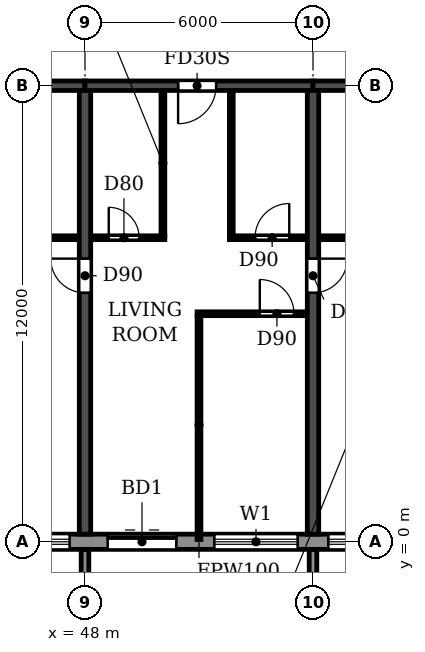
"""IFC4 building model, lengths in metres.
Left out: names, types, materials, properties, quantities, classifications, styles, units other than length and angle.
Written with IfcOpenShell. Run it as: python <this file> out.ifc"""

import sys

from ifc_helpers import new_model, si_unit, direction, frame, frame_2d, origin, place, context, subcontext, project, spatial, polyline, rectangle, outline, extrude, source, transform, mapped, element, fill, save


model = new_model("IFC4")
c1 = context("Model", 3, precision=1e-05, world=origin(), true_north=direction((0.0, 1.0)))
c2 = subcontext(c1, "Body", "Model", "MODEL_VIEW")
j1 = project(units=[si_unit("LENGTHUNIT", "METRE"), si_unit("PLANEANGLEUNIT", "RADIAN")], contexts=[c1])
p1 = place(None, origin())
s1 = spatial("IfcSite", under=j1, at=p1, CompositionType="ELEMENT")
p2 = place(p1, origin())
s2 = spatial("IfcBuilding", under=s1, at=p2, CompositionType="ELEMENT")
p3 = place(p2, frame((0.0, 0.0, 152.1)))
s3 = spatial("IfcBuildingStorey", under=s2, at=p3, CompositionType="ELEMENT", Elevation=152.1)
p4 = place(p3, frame((48.0, 0.2, 0.0), z_axis=(0.0, 0.0, 1.0), x_axis=(0.0, 1.0, 0.0)))
e1 = element("IfcWall", 1, at=p4, inside=s3, PredefinedType="SHEAR", context=c2, shape_type="SweptSolid", body=[
    extrude(rectangle(XDim=11.675, YDim=0.3, at=frame_2d((5.837, 0.0))), origin(), (0.0, 0.0, 1.0), 3.07),
])
p5 = place(p4, frame((6.35, 0.0, 0.0)))
e2 = element("IfcOpeningElement", 2, at=p5, cuts=e1, PredefinedType="OPENING", context=c2, shape_type="SweptSolid", body=[
    extrude(rectangle(XDim=0.9, YDim=2.1, at=frame_2d((0.45, 1.05))), frame((0.0, 0.16, 0.0), z_axis=(0.0, -1.0, 0.0), x_axis=(1.0, 0.0, 0.0)), (0.0, 0.0, 1.0), 0.32),
])
p6 = place(p3, frame((54.0, 0.2, 0.0), z_axis=(0.0, 0.0, 1.0), x_axis=(0.0, 1.0, 0.0)))
e3 = element("IfcWall", 3, at=p6, inside=s3, PredefinedType="SHEAR", context=c2, shape_type="SweptSolid", body=[
    extrude(rectangle(XDim=11.675, YDim=0.3, at=frame_2d((5.837, 0.0))), origin(), (0.0, 0.0, 1.0), 3.07),
])
p7 = place(p6, frame((6.35, 0.0, 0.0)))
e4 = element("IfcOpeningElement", 4, at=p7, cuts=e3, PredefinedType="OPENING", context=c2, shape_type="SweptSolid", body=[
    extrude(rectangle(XDim=0.9, YDim=2.1, at=frame_2d((0.45, 1.05))), frame((0.0, 0.16, 0.0), z_axis=(0.0, -1.0, 0.0), x_axis=(1.0, 0.0, 0.0)), (0.0, 0.0, 1.0), 0.32),
])
p8 = place(p3, frame((42.0, 12.0, 0.0), z_axis=(0.0, 0.0, 1.0), x_axis=(1.0, 0.0, 0.0)))
e5 = element("IfcWall", 5, at=p8, inside=s3, PredefinedType="SHEAR", context=c2, shape_type="SweptSolid", body=[
    extrude(rectangle(XDim=6.0, YDim=0.25, at=frame_2d((3.0, 0.0))), origin(), (0.0, 0.0, 1.0), 2.47),
])
p9 = place(p3, frame((48.0, 12.0, 0.0), z_axis=(0.0, 0.0, 1.0), x_axis=(1.0, 0.0, 0.0)))
e6 = element("IfcWall", 6, at=p9, inside=s3, PredefinedType="SHEAR", context=c2, shape_type="SweptSolid", body=[
    extrude(rectangle(XDim=6.0, YDim=0.25, at=frame_2d((3.0, 0.0))), origin(), (0.0, 0.0, 1.0), 2.47),
])
p10 = place(p9, frame((2.45, 0.0, 0.0)))
e7 = element("IfcOpeningElement", 7, at=p10, cuts=e6, PredefinedType="OPENING", context=c2, shape_type="SweptSolid", body=[
    extrude(rectangle(XDim=1.0, YDim=2.1, at=frame_2d((0.5, 1.05))), frame((0.0, 0.135, 0.0), z_axis=(0.0, -1.0, 0.0), x_axis=(1.0, 0.0, 0.0)), (0.0, 0.0, 1.0), 0.27),
])
p11 = place(p3, frame((54.0, 12.0, 0.0), z_axis=(0.0, 0.0, 1.0), x_axis=(1.0, 0.0, 0.0)))
e8 = element("IfcWall", 8, at=p11, inside=s3, PredefinedType="SHEAR", context=c2, shape_type="SweptSolid", body=[
    extrude(rectangle(XDim=6.0, YDim=0.25, at=frame_2d((3.0, 0.0))), origin(), (0.0, 0.0, 1.0), 2.47),
])
p12 = place(p3, frame((16.683, 0.0, 0.0), z_axis=(0.0, 0.0, 1.0), x_axis=(1.0, 0.0, 0.0)))
e9 = element("IfcWall", 9, at=p12, inside=s3, PredefinedType="STANDARD", context=c2, shape_type="SweptSolid", body=[
    extrude(rectangle(XDim=68.634, YDim=0.4, at=frame_2d((34.317, 0.0))), origin(), (0.0, 0.0, 1.0), 3.07),
])
p13 = place(p12, frame((1.717, 0.0, 0.9)))
e10 = element("IfcOpeningElement", 10, at=p13, cuts=e9, PredefinedType="OPENING", context=c2, shape_type="SweptSolid", body=[
    extrude(rectangle(XDim=2.2, YDim=1.5, at=frame_2d((1.1, 0.75))), frame((0.0, 0.21, 0.0), z_axis=(0.0, -1.0, 0.0), x_axis=(1.0, 0.0, 0.0)), (0.0, 0.0, 1.0), 0.42),
])
p14 = place(p12, frame((4.717, 0.0, 0.9)))
e11 = element("IfcOpeningElement", 11, at=p14, cuts=e9, PredefinedType="OPENING", context=c2, shape_type="SweptSolid", body=[
    extrude(rectangle(XDim=2.2, YDim=1.5, at=frame_2d((1.1, 0.75))), frame((0.0, 0.21, 0.0), z_axis=(0.0, -1.0, 0.0), x_axis=(1.0, 0.0, 0.0)), (0.0, 0.0, 1.0), 0.42),
])
p15 = place(p12, frame((7.917, 0.0, 0.0)))
e12 = element("IfcOpeningElement", 12, at=p15, cuts=e9, PredefinedType="OPENING", context=c2, shape_type="SweptSolid", body=[
    extrude(rectangle(XDim=1.8, YDim=2.4, at=frame_2d((0.9, 1.2))), frame((0.0, 0.21, 0.0), z_axis=(0.0, -1.0, 0.0), x_axis=(1.0, 0.0, 0.0)), (0.0, 0.0, 1.0), 0.42),
])
p16 = place(p12, frame((10.717, 0.0, 0.9)))
e13 = element("IfcOpeningElement", 13, at=p16, cuts=e9, PredefinedType="OPENING", context=c2, shape_type="SweptSolid", body=[
    extrude(rectangle(XDim=2.2, YDim=1.5, at=frame_2d((1.1, 0.75))), frame((0.0, 0.21, 0.0), z_axis=(0.0, -1.0, 0.0), x_axis=(1.0, 0.0, 0.0)), (0.0, 0.0, 1.0), 0.42),
])
p17 = place(p12, frame((13.717, 0.0, 0.9)))
e14 = element("IfcOpeningElement", 14, at=p17, cuts=e9, PredefinedType="OPENING", context=c2, shape_type="SweptSolid", body=[
    extrude(rectangle(XDim=2.2, YDim=1.5, at=frame_2d((1.1, 0.75))), frame((0.0, 0.21, 0.0), z_axis=(0.0, -1.0, 0.0), x_axis=(1.0, 0.0, 0.0)), (0.0, 0.0, 1.0), 0.42),
])
p18 = place(p12, frame((16.717, 0.0, 0.9)))
e15 = element("IfcOpeningElement", 15, at=p18, cuts=e9, PredefinedType="OPENING", context=c2, shape_type="SweptSolid", body=[
    extrude(rectangle(XDim=2.2, YDim=1.5, at=frame_2d((1.1, 0.75))), frame((0.0, 0.21, 0.0), z_axis=(0.0, -1.0, 0.0), x_axis=(1.0, 0.0, 0.0)), (0.0, 0.0, 1.0), 0.42),
])
p19 = place(p12, frame((19.717, 0.0, 0.9)))
e16 = element("IfcOpeningElement", 16, at=p19, cuts=e9, PredefinedType="OPENING", context=c2, shape_type="SweptSolid", body=[
    extrude(rectangle(XDim=2.2, YDim=1.5, at=frame_2d((1.1, 0.75))), frame((0.0, 0.21, 0.0), z_axis=(0.0, -1.0, 0.0), x_axis=(1.0, 0.0, 0.0)), (0.0, 0.0, 1.0), 0.42),
])
p20 = place(p12, frame((22.917, 0.0, 0.0)))
e17 = element("IfcOpeningElement", 17, at=p20, cuts=e9, PredefinedType="OPENING", context=c2, shape_type="SweptSolid", body=[
    extrude(rectangle(XDim=1.8, YDim=2.4, at=frame_2d((0.9, 1.2))), frame((0.0, 0.21, 0.0), z_axis=(0.0, -1.0, 0.0), x_axis=(1.0, 0.0, 0.0)), (0.0, 0.0, 1.0), 0.42),
])
p21 = place(p12, frame((25.717, 0.0, 0.9)))
e18 = element("IfcOpeningElement", 18, at=p21, cuts=e9, PredefinedType="OPENING", context=c2, shape_type="SweptSolid", body=[
    extrude(rectangle(XDim=2.2, YDim=1.5, at=frame_2d((1.1, 0.75))), frame((0.0, 0.21, 0.0), z_axis=(0.0, -1.0, 0.0), x_axis=(1.0, 0.0, 0.0)), (0.0, 0.0, 1.0), 0.42),
])
p22 = place(p12, frame((28.717, 0.0, 0.9)))
e19 = element("IfcOpeningElement", 19, at=p22, cuts=e9, PredefinedType="OPENING", context=c2, shape_type="SweptSolid", body=[
    extrude(rectangle(XDim=2.2, YDim=1.5, at=frame_2d((1.1, 0.75))), frame((0.0, 0.21, 0.0), z_axis=(0.0, -1.0, 0.0), x_axis=(1.0, 0.0, 0.0)), (0.0, 0.0, 1.0), 0.42),
])
p23 = place(p12, frame((31.917, 0.0, 0.0)))
e20 = element("IfcOpeningElement", 20, at=p23, cuts=e9, PredefinedType="OPENING", context=c2, shape_type="SweptSolid", body=[
    extrude(rectangle(XDim=1.8, YDim=2.4, at=frame_2d((0.9, 1.2))), frame((0.0, 0.21, 0.0), z_axis=(0.0, -1.0, 0.0), x_axis=(1.0, 0.0, 0.0)), (0.0, 0.0, 1.0), 0.42),
])
p24 = place(p12, frame((34.717, 0.0, 0.9)))
e21 = element("IfcOpeningElement", 21, at=p24, cuts=e9, PredefinedType="OPENING", context=c2, shape_type="SweptSolid", body=[
    extrude(rectangle(XDim=2.2, YDim=1.5, at=frame_2d((1.1, 0.75))), frame((0.0, 0.21, 0.0), z_axis=(0.0, -1.0, 0.0), x_axis=(1.0, 0.0, 0.0)), (0.0, 0.0, 1.0), 0.42),
])
p25 = place(p12, frame((37.717, 0.0, 0.9)))
e22 = element("IfcOpeningElement", 22, at=p25, cuts=e9, PredefinedType="OPENING", context=c2, shape_type="SweptSolid", body=[
    extrude(rectangle(XDim=2.2, YDim=1.5, at=frame_2d((1.1, 0.75))), frame((0.0, 0.21, 0.0), z_axis=(0.0, -1.0, 0.0), x_axis=(1.0, 0.0, 0.0)), (0.0, 0.0, 1.0), 0.42),
])
p26 = place(p12, frame((40.717, 0.0, 0.9)))
e23 = element("IfcOpeningElement", 23, at=p26, cuts=e9, PredefinedType="OPENING", context=c2, shape_type="SweptSolid", body=[
    extrude(rectangle(XDim=2.2, YDim=1.5, at=frame_2d((1.1, 0.75))), frame((0.0, 0.21, 0.0), z_axis=(0.0, -1.0, 0.0), x_axis=(1.0, 0.0, 0.0)), (0.0, 0.0, 1.0), 0.42),
])
p27 = place(p12, frame((43.717, 0.0, 0.9)))
e24 = element("IfcOpeningElement", 24, at=p27, cuts=e9, PredefinedType="OPENING", context=c2, shape_type="SweptSolid", body=[
    extrude(rectangle(XDim=2.2, YDim=1.5, at=frame_2d((1.1, 0.75))), frame((0.0, 0.21, 0.0), z_axis=(0.0, -1.0, 0.0), x_axis=(1.0, 0.0, 0.0)), (0.0, 0.0, 1.0), 0.42),
])
p28 = place(p12, frame((46.917, 0.0, 0.0)))
e25 = element("IfcOpeningElement", 25, at=p28, cuts=e9, PredefinedType="OPENING", context=c2, shape_type="SweptSolid", body=[
    extrude(rectangle(XDim=1.8, YDim=2.4, at=frame_2d((0.9, 1.2))), frame((0.0, 0.21, 0.0), z_axis=(0.0, -1.0, 0.0), x_axis=(1.0, 0.0, 0.0)), (0.0, 0.0, 1.0), 0.42),
])
p29 = place(p12, frame((49.717, 0.0, 0.9)))
e26 = element("IfcOpeningElement", 26, at=p29, cuts=e9, PredefinedType="OPENING", context=c2, shape_type="SweptSolid", body=[
    extrude(rectangle(XDim=2.2, YDim=1.5, at=frame_2d((1.1, 0.75))), frame((0.0, 0.21, 0.0), z_axis=(0.0, -1.0, 0.0), x_axis=(1.0, 0.0, 0.0)), (0.0, 0.0, 1.0), 0.42),
])
p30 = place(p12, frame((52.717, 0.0, 0.9)))
e27 = element("IfcOpeningElement", 27, at=p30, cuts=e9, PredefinedType="OPENING", context=c2, shape_type="SweptSolid", body=[
    extrude(rectangle(XDim=2.2, YDim=1.5, at=frame_2d((1.1, 0.75))), frame((0.0, 0.21, 0.0), z_axis=(0.0, -1.0, 0.0), x_axis=(1.0, 0.0, 0.0)), (0.0, 0.0, 1.0), 0.42),
])
p31 = place(p12, frame((55.717, 0.0, 0.9)))
e28 = element("IfcOpeningElement", 28, at=p31, cuts=e9, PredefinedType="OPENING", context=c2, shape_type="SweptSolid", body=[
    extrude(rectangle(XDim=2.2, YDim=1.5, at=frame_2d((1.1, 0.75))), frame((0.0, 0.21, 0.0), z_axis=(0.0, -1.0, 0.0), x_axis=(1.0, 0.0, 0.0)), (0.0, 0.0, 1.0), 0.42),
])
p32 = place(p12, frame((58.917, 0.0, 0.0)))
e29 = element("IfcOpeningElement", 29, at=p32, cuts=e9, PredefinedType="OPENING", context=c2, shape_type="SweptSolid", body=[
    extrude(rectangle(XDim=1.8, YDim=2.4, at=frame_2d((0.9, 1.2))), frame((0.0, 0.21, 0.0), z_axis=(0.0, -1.0, 0.0), x_axis=(1.0, 0.0, 0.0)), (0.0, 0.0, 1.0), 0.42),
])
p33 = place(p12, frame((61.717, 0.0, 0.9)))
e30 = element("IfcOpeningElement", 30, at=p33, cuts=e9, PredefinedType="OPENING", context=c2, shape_type="SweptSolid", body=[
    extrude(rectangle(XDim=2.2, YDim=1.5, at=frame_2d((1.1, 0.75))), frame((0.0, 0.21, 0.0), z_axis=(0.0, -1.0, 0.0), x_axis=(1.0, 0.0, 0.0)), (0.0, 0.0, 1.0), 0.42),
])
p34 = place(p12, frame((64.717, 0.0, 0.9)))
e31 = element("IfcOpeningElement", 31, at=p34, cuts=e9, PredefinedType="OPENING", context=c2, shape_type="SweptSolid", body=[
    extrude(rectangle(XDim=2.2, YDim=1.5, at=frame_2d((1.1, 0.75))), frame((0.0, 0.21, 0.0), z_axis=(0.0, -1.0, 0.0), x_axis=(1.0, 0.0, 0.0)), (0.0, 0.0, 1.0), 0.42),
])
m1 = source(origin(), c2, "Body", "SweptSolid", [
    extrude(outline(polyline([(0.0, 0.0), (0.2, 0.0), (0.2, 1.65), (0.0, 1.65), (0.0, 0.0)])), origin(), (0.0, 0.0, 1.0), 3.1),
])
for number, where in (
    (32, (47.9, -1.85, 0.0)),
    (33, (53.9, -1.85, 0.0)),
):
    element("IfcWall", number, at=place(p3, frame(where)), inside=s3, PredefinedType="STANDARD", context=c2, shape_type="MappedRepresentation", body=[
        mapped(m1, transform((0.0, 0.0, 0.0))),
    ])
p35 = place(p3, frame((50.95, 6.0, 0.0), z_axis=(0.0, 0.0, 1.0), x_axis=(1.0, 0.0, 0.0)))
e34 = element("IfcWall", 34, at=p35, inside=s3, PredefinedType="PARTITIONING", context=c2, shape_type="SweptSolid", body=[
    extrude(rectangle(XDim=2.89, YDim=0.1, at=frame_2d((1.445, 0.0))), origin(), (0.0, 0.0, 1.0), 3.07),
])
p36 = place(p35, frame((1.65, 0.0, 0.0)))
e35 = element("IfcOpeningElement", 35, at=p36, cuts=e34, PredefinedType="OPENING", context=c2, shape_type="SweptSolid", body=[
    extrude(rectangle(XDim=0.9, YDim=2.1, at=frame_2d((0.45, 1.05))), frame((0.0, 0.06, 0.0), z_axis=(0.0, -1.0, 0.0), x_axis=(1.0, 0.0, 0.0)), (0.0, 0.0, 1.0), 0.12),
])
p37 = place(p3, frame((45.1, 8.0, 0.0), z_axis=(0.0, 0.0, 1.0), x_axis=(1.0, 0.0, 0.0)))
e36 = element("IfcWall", 36, at=p37, inside=s3, PredefinedType="PARTITIONING", context=c2, shape_type="SweptSolid", body=[
    extrude(rectangle(XDim=2.74, YDim=0.1, at=frame_2d((1.37, 0.0))), origin(), (0.0, 0.0, 1.0), 3.07),
])
p38 = place(p37, frame((1.0, 0.0, 0.0)))
e37 = element("IfcOpeningElement", 37, at=p38, cuts=e36, PredefinedType="OPENING", context=c2, shape_type="SweptSolid", body=[
    extrude(rectangle(XDim=0.8, YDim=2.1, at=frame_2d((0.4, 1.05))), frame((0.0, 0.06, 0.0), z_axis=(0.0, -1.0, 0.0), x_axis=(1.0, 0.0, 0.0)), (0.0, 0.0, 1.0), 0.12),
])
p39 = place(p3, frame((48.16, 8.0, 0.0), z_axis=(0.0, 0.0, 1.0), x_axis=(1.0, 0.0, 0.0)))
e38 = element("IfcWall", 38, at=p39, inside=s3, PredefinedType="PARTITIONING", context=c2, shape_type="SweptSolid", body=[
    extrude(rectangle(XDim=1.94, YDim=0.1, at=frame_2d((0.97, 0.0))), origin(), (0.0, 0.0, 1.0), 3.07),
])
p40 = place(p39, frame((0.465, 0.0, 0.0)))
e39 = element("IfcOpeningElement", 39, at=p40, cuts=e38, PredefinedType="OPENING", context=c2, shape_type="SweptSolid", body=[
    extrude(rectangle(XDim=0.8, YDim=2.1, at=frame_2d((0.4, 1.05))), frame((0.0, 0.06, 0.0), z_axis=(0.0, -1.0, 0.0), x_axis=(1.0, 0.0, 0.0)), (0.0, 0.0, 1.0), 0.12),
])
p41 = place(p3, frame((51.8, 8.0, 0.0), z_axis=(0.0, 0.0, 1.0), x_axis=(1.0, 0.0, 0.0)))
e40 = element("IfcWall", 40, at=p41, inside=s3, PredefinedType="PARTITIONING", context=c2, shape_type="SweptSolid", body=[
    extrude(rectangle(XDim=2.04, YDim=0.1, at=frame_2d((1.02, 0.0))), origin(), (0.0, 0.0, 1.0), 3.07),
])
p42 = place(p41, frame((0.675, 0.0, 0.0)))
e41 = element("IfcOpeningElement", 41, at=p42, cuts=e40, PredefinedType="OPENING", context=c2, shape_type="SweptSolid", body=[
    extrude(rectangle(XDim=0.9, YDim=2.1, at=frame_2d((0.45, 1.05))), frame((0.0, 0.06, 0.0), z_axis=(0.0, -1.0, 0.0), x_axis=(1.0, 0.0, 0.0)), (0.0, 0.0, 1.0), 0.12),
])
p43 = place(p3, frame((54.16, 8.0, 0.0), z_axis=(0.0, 0.0, 1.0), x_axis=(1.0, 0.0, 0.0)))
e42 = element("IfcWall", 42, at=p43, inside=s3, PredefinedType="PARTITIONING", context=c2, shape_type="SweptSolid", body=[
    extrude(rectangle(XDim=2.94, YDim=0.1, at=frame_2d((1.47, 0.0))), origin(), (0.0, 0.0, 1.0), 3.07),
])
p44 = place(p43, frame((0.94, 0.0, 0.0)))
e43 = element("IfcOpeningElement", 43, at=p44, cuts=e42, PredefinedType="OPENING", context=c2, shape_type="SweptSolid", body=[
    extrude(rectangle(XDim=0.8, YDim=2.1, at=frame_2d((0.4, 1.05))), frame((0.0, 0.06, 0.0), z_axis=(0.0, -1.0, 0.0), x_axis=(1.0, 0.0, 0.0)), (0.0, 0.0, 1.0), 0.12),
])
p45 = place(p3, frame((50.05, 8.05, 0.0), z_axis=(0.0, 0.0, 1.0), x_axis=(0.0, 1.0, 0.0)))
e44 = element("IfcWall", 44, at=p45, inside=s3, PredefinedType="PARTITIONING", context=c2, shape_type="SweptSolid", body=[
    extrude(rectangle(XDim=3.815, YDim=0.1, at=frame_2d((1.907, 0.0))), origin(), (0.0, 0.0, 1.0), 3.07),
])
p46 = place(p3, frame((51.0, 0.06, 0.0), z_axis=(0.0, 0.0, 1.0), x_axis=(0.0, 1.0, 0.0)))
e45 = element("IfcWall", 45, at=p46, inside=s3, PredefinedType="PARTITIONING", context=c2, shape_type="SweptSolid", body=[
    extrude(rectangle(XDim=5.89, YDim=0.1, at=frame_2d((2.945, 0.0))), origin(), (0.0, 0.0, 1.0), 3.07),
])
p47 = place(p3, frame((51.85, 8.05, 0.0), z_axis=(0.0, 0.0, 1.0), x_axis=(0.0, 1.0, 0.0)))
e46 = element("IfcWall", 46, at=p47, inside=s3, PredefinedType="PARTITIONING", context=c2, shape_type="SweptSolid", body=[
    extrude(rectangle(XDim=3.815, YDim=0.1, at=frame_2d((1.907, 0.0))), origin(), (0.0, 0.0, 1.0), 3.07),
])
p48 = place(p22, origin())
e47 = element("IfcWindow", 47, at=p48, inside=s3, PartitioningType="DOUBLE_PANEL_HORIZONTAL", PredefinedType="WINDOW", context=c2, shape_type="SweptSolid", body=[
    extrude(rectangle(XDim=2.2, YDim=1.5, at=frame_2d((1.1, 0.75))), frame((0.0, 0.03, 0.0), z_axis=(0.0, -1.0, 0.0), x_axis=(1.0, 0.0, 0.0)), (0.0, 0.0, 1.0), 0.06),
])
fill(e19, e47)
p49 = place(p23, origin())
e48 = element("IfcDoor", 48, at=p49, inside=s3, OperationType="DOUBLE_DOOR_SLIDING", PredefinedType="DOOR", context=c2, shape_type="SweptSolid", body=[
    extrude(rectangle(XDim=1.8, YDim=2.4, at=frame_2d((0.9, 1.2))), frame((0.0, 0.025, 0.0), z_axis=(0.0, -1.0, 0.0), x_axis=(1.0, 0.0, 0.0)), (0.0, 0.0, 1.0), 0.05),
])
fill(e20, e48)
p50 = place(p24, origin())
e49 = element("IfcWindow", 49, at=p50, inside=s3, PartitioningType="DOUBLE_PANEL_HORIZONTAL", PredefinedType="WINDOW", context=c2, shape_type="SweptSolid", body=[
    extrude(rectangle(XDim=2.2, YDim=1.5, at=frame_2d((1.1, 0.75))), frame((0.0, 0.03, 0.0), z_axis=(0.0, -1.0, 0.0), x_axis=(1.0, 0.0, 0.0)), (0.0, 0.0, 1.0), 0.06),
])
fill(e21, e49)
p51 = place(p25, origin())
e50 = element("IfcWindow", 50, at=p51, inside=s3, PartitioningType="DOUBLE_PANEL_HORIZONTAL", PredefinedType="WINDOW", context=c2, shape_type="SweptSolid", body=[
    extrude(rectangle(XDim=2.2, YDim=1.5, at=frame_2d((1.1, 0.75))), frame((0.0, 0.03, 0.0), z_axis=(0.0, -1.0, 0.0), x_axis=(1.0, 0.0, 0.0)), (0.0, 0.0, 1.0), 0.06),
])
fill(e22, e50)
p52 = place(p5, origin())
e51 = element("IfcDoor", 51, at=p52, inside=s3, OperationType="SINGLE_SWING_RIGHT", PredefinedType="DOOR", context=c2, shape_type="SweptSolid", body=[
    extrude(rectangle(XDim=0.9, YDim=2.1, at=frame_2d((0.45, 1.05))), frame((0.0, 0.025, 0.0), z_axis=(0.0, -1.0, 0.0), x_axis=(1.0, 0.0, 0.0)), (0.0, 0.0, 1.0), 0.05),
])
fill(e2, e51)
p53 = place(p40, origin())
e52 = element("IfcDoor", 52, at=p53, inside=s3, OperationType="SINGLE_SWING_LEFT", PredefinedType="DOOR", context=c2, shape_type="SweptSolid", body=[
    extrude(rectangle(XDim=0.8, YDim=2.1, at=frame_2d((0.4, 1.05))), frame((0.0, 0.025, 0.0), z_axis=(0.0, -1.0, 0.0), x_axis=(1.0, 0.0, 0.0)), (0.0, 0.0, 1.0), 0.05),
])
fill(e39, e52)
p54 = place(p10, frame((1.0, 0.0, 0.0), z_axis=(0.0, 0.0, 1.0), x_axis=(-1.0, 0.0, 0.0)))
e53 = element("IfcDoor", 53, at=p54, inside=s3, OperationType="SINGLE_SWING_RIGHT", PredefinedType="DOOR", context=c2, shape_type="SweptSolid", body=[
    extrude(rectangle(XDim=1.0, YDim=2.1, at=frame_2d((0.5, 1.05))), frame((0.0, 0.025, 0.0), z_axis=(0.0, -1.0, 0.0), x_axis=(1.0, 0.0, 0.0)), (0.0, 0.0, 1.0), 0.05),
])
fill(e7, e53)
p55 = place(p42, origin())
e54 = element("IfcDoor", 54, at=p55, inside=s3, OperationType="SINGLE_SWING_RIGHT", PredefinedType="DOOR", context=c2, shape_type="SweptSolid", body=[
    extrude(rectangle(XDim=0.9, YDim=2.1, at=frame_2d((0.45, 1.05))), frame((0.0, 0.025, 0.0), z_axis=(0.0, -1.0, 0.0), x_axis=(1.0, 0.0, 0.0)), (0.0, 0.0, 1.0), 0.05),
])
fill(e41, e54)
p56 = place(p36, origin())
e55 = element("IfcDoor", 55, at=p56, inside=s3, OperationType="SINGLE_SWING_LEFT", PredefinedType="DOOR", context=c2, shape_type="SweptSolid", body=[
    extrude(rectangle(XDim=0.9, YDim=2.1, at=frame_2d((0.45, 1.05))), frame((0.0, 0.025, 0.0), z_axis=(0.0, -1.0, 0.0), x_axis=(1.0, 0.0, 0.0)), (0.0, 0.0, 1.0), 0.05),
])
fill(e35, e55)
p57 = place(p7, frame((0.9, 0.0, 0.0), z_axis=(0.0, 0.0, 1.0), x_axis=(-1.0, 0.0, 0.0)))
e56 = element("IfcDoor", 56, at=p57, inside=s3, OperationType="SINGLE_SWING_LEFT", PredefinedType="DOOR", context=c2, shape_type="SweptSolid", body=[
    extrude(rectangle(XDim=0.9, YDim=2.1, at=frame_2d((0.45, 1.05))), frame((0.0, 0.025, 0.0), z_axis=(0.0, -1.0, 0.0), x_axis=(1.0, 0.0, 0.0)), (0.0, 0.0, 1.0), 0.05),
])
fill(e4, e56)
save(model, sys.argv[1])
